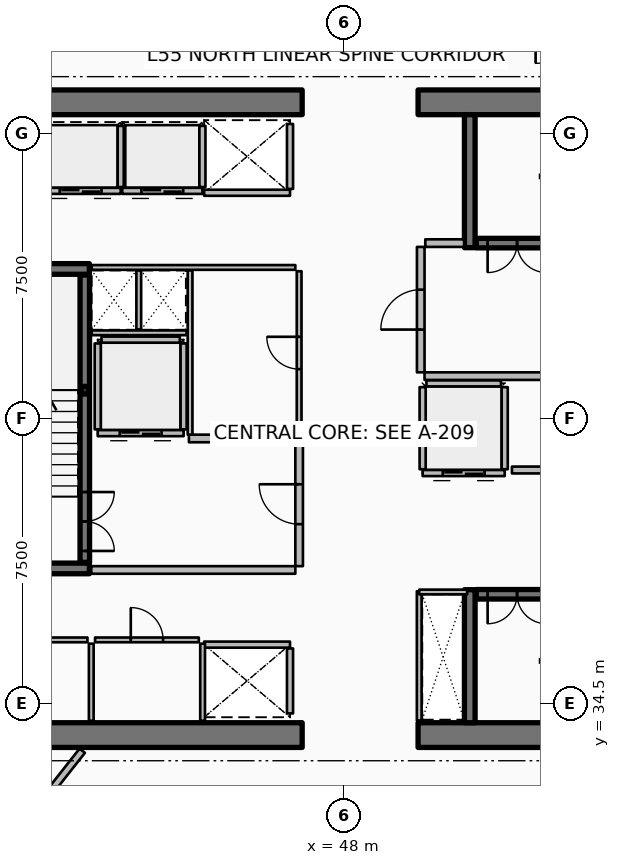
"""IFC4 building model, lengths in metres.
Left out: names, types, materials, properties, quantities, classifications, styles, units other than length and angle.
Written with IfcOpenShell. Run it as: python <this file> out.ifc"""

import sys

from ifc_helpers import new_model, si_unit, direction, frame, frame_2d, origin, origin_2d, place, context, subcontext, project, spatial, rectangle, hollow_rectangle, extrude, element, fill, save


model = new_model("IFC4")
c1 = context("Model", 3, precision=1e-05, world=origin(), true_north=direction((0.0, 1.0)))
c2 = subcontext(c1, "Body", "Model", "MODEL_VIEW")
j1 = project(units=[si_unit("LENGTHUNIT", "METRE"), si_unit("PLANEANGLEUNIT", "RADIAN")], contexts=[c1])
p1 = place(None, origin())
s1 = spatial("IfcSite", under=j1, at=p1, CompositionType="ELEMENT")
p2 = place(p1, origin())
s2 = spatial("IfcBuilding", under=s1, at=p2, CompositionType="ELEMENT")
p3 = place(p2, frame((0.0, 0.0, 217.8)))
s3 = spatial("IfcBuildingStorey", under=s2, at=p3, CompositionType="ELEMENT", Elevation=217.8)
for number, where, z_axis, x_axis in (
    (1, (37.15, 33.675, 0.0), (0.0, 0.0, 1.0), (1.0, 0.0, 0.0)),
    (2, (49.95, 33.675, 0.0), (0.0, 0.0, 1.0), (1.0, 0.0, 0.0)),
    (3, (37.15, 50.325, 0.0), (0.0, 0.0, 1.0), (1.0, 0.0, 0.0)),
    (4, (49.95, 50.325, 0.0), (0.0, 0.0, 1.0), (1.0, 0.0, 0.0)),
):
    element("IfcWall", number, at=place(p3, frame(where, z_axis=z_axis, x_axis=x_axis)), inside=s3, PredefinedType="SHEAR", context=c2, shape_type="SweptSolid", body=[
        extrude(rectangle(XDim=9.75, YDim=0.65, at=frame_2d((4.875, 0.0))), origin(), (0.0, 0.0, 1.0), 3.75),
    ])
for number, where, z_axis, x_axis in (
    (5, (37.8, 38.06, 0.0), (0.0, 0.0, 1.0), (1.0, 0.0, 0.0)),
    (6, (37.8, 45.94, 0.0), (0.0, 0.0, 1.0), (1.0, 0.0, 0.0)),
    (7, (51.31, 46.5, 0.0), (0.0, 0.0, 1.0), (0.0, 1.0, 0.0)),
    (8, (51.31, 34.0, 0.0), (0.0, 0.0, 1.0), (0.0, 1.0, 0.0)),
):
    element("IfcWall", number, at=place(p3, frame(where, z_axis=z_axis, x_axis=x_axis)), inside=s3, PredefinedType="SHEAR", context=c2, shape_type="SweptSolid", body=[
        extrude(rectangle(XDim=3.5, YDim=0.28, at=frame_2d((1.75, 0.0))), origin(), (0.0, 0.0, 1.0), 3.75),
    ])
p4 = place(p3, frame((41.18, 42.75, 0.0), z_axis=(0.0, 0.0, 1.0), x_axis=(1.0, 0.0, 0.0)))
e9 = element("IfcColumn", 9, at=p4, inside=s3, PredefinedType="COLUMN", context=c2, shape_type="SweptSolid", body=[
    extrude(hollow_rectangle(XDim=0.2, YDim=0.2, WallThickness=0.01, InnerFilletRadius=0.01, OuterFilletRadius=0.02, at=origin_2d()), origin(), (0.0, 0.0, 1.0), 1.67),
])
p5 = place(p3, frame((41.18, 38.22, 0.0), z_axis=(0.0, 0.0, 1.0), x_axis=(0.0, 1.0, 0.0)))
e10 = element("IfcWall", 10, at=p5, inside=s3, PredefinedType="SOLIDWALL", context=c2, shape_type="SweptSolid", body=[
    extrude(rectangle(XDim=7.56, YDim=0.25, at=frame_2d((3.78, 0.0))), origin(), (0.0, 0.0, 1.0), 3.5),
])
p6 = place(p5, frame((0.3, 0.0, 0.0)))
e11 = element("IfcOpeningElement", 11, at=p6, cuts=e10, PredefinedType="OPENING", context=c2, shape_type="SweptSolid", body=[
    extrude(rectangle(XDim=1.55, YDim=2.15, at=frame_2d((0.775, 1.075))), frame((0.0, 0.135, 0.0), z_axis=(0.0, -1.0, 0.0), x_axis=(1.0, 0.0, 0.0)), (0.0, 0.0, 1.0), 0.27),
])
p7 = place(p3, frame((51.48, 46.62, 0.0), z_axis=(0.0, 0.0, 1.0), x_axis=(1.0, 0.0, 0.0)))
e12 = element("IfcWall", 12, at=p7, inside=s3, PredefinedType="SOLIDWALL", context=c2, shape_type="SweptSolid", body=[
    extrude(rectangle(XDim=7.54, YDim=0.25, at=frame_2d((3.77, 0.0))), origin(), (0.0, 0.0, 1.0), 3.5),
])
p8 = place(p7, frame((0.3, 0.0, 0.0)))
e13 = element("IfcOpeningElement", 13, at=p8, cuts=e12, PredefinedType="OPENING", context=c2, shape_type="SweptSolid", body=[
    extrude(rectangle(XDim=1.55, YDim=2.15, at=frame_2d((0.775, 1.075))), frame((0.0, 0.135, 0.0), z_axis=(0.0, -1.0, 0.0), x_axis=(1.0, 0.0, 0.0)), (0.0, 0.0, 1.0), 0.27),
])
p9 = place(p3, frame((51.48, 37.38, 0.0), z_axis=(0.0, 0.0, 1.0), x_axis=(1.0, 0.0, 0.0)))
e14 = element("IfcWall", 14, at=p9, inside=s3, PredefinedType="SOLIDWALL", context=c2, shape_type="SweptSolid", body=[
    extrude(rectangle(XDim=7.54, YDim=0.25, at=frame_2d((3.77, 0.0))), origin(), (0.0, 0.0, 1.0), 3.5),
])
p10 = place(p9, frame((0.3, 0.0, 0.0)))
e15 = element("IfcOpeningElement", 15, at=p10, cuts=e14, PredefinedType="OPENING", context=c2, shape_type="SweptSolid", body=[
    extrude(rectangle(XDim=1.55, YDim=2.15, at=frame_2d((0.775, 1.075))), frame((0.0, 0.135, 0.0), z_axis=(0.0, -1.0, 0.0), x_axis=(1.0, 0.0, 0.0)), (0.0, 0.0, 1.0), 0.27),
])
p11 = place(p3, frame((42.125, 47.995, 0.0), z_axis=(0.0, 0.0, 1.0), x_axis=(-1.0, 0.0, 0.0)))
e16 = element("IfcWall", 16, at=p11, inside=s3, PredefinedType="PARTITIONING", context=c2, shape_type="SweptSolid", body=[
    extrude(rectangle(XDim=2.11, YDim=0.16, at=frame_2d((1.055, 0.0))), origin(), (0.0, 0.0, 1.0), 3.5),
])
p12 = place(p11, frame((0.505, 0.0, 0.0)))
e17 = element("IfcOpeningElement", 17, at=p12, cuts=e16, PredefinedType="OPENING", context=c2, shape_type="SweptSolid", body=[
    extrude(rectangle(XDim=1.1, YDim=2.1, at=frame_2d((0.55, 1.05))), frame((0.0, 0.09, 0.0), z_axis=(0.0, -1.0, 0.0), x_axis=(1.0, 0.0, 0.0)), (0.0, 0.0, 1.0), 0.18),
])
p13 = place(p3, frame((42.125, 48.095, 0.0), z_axis=(0.0, 0.0, 1.0), x_axis=(0.0, 1.0, 0.0)))
e18 = element("IfcWall", 18, at=p13, inside=s3, PredefinedType="PARTITIONING", context=c2, shape_type="SweptSolid", body=[
    extrude(rectangle(XDim=1.61, YDim=0.16, at=frame_2d((0.805, 0.0))), origin(), (0.0, 0.0, 1.0), 3.5),
])
p14 = place(p3, frame((44.275, 47.995, 0.0), z_axis=(0.0, 0.0, 1.0), x_axis=(-1.0, 0.0, 0.0)))
e19 = element("IfcWall", 19, at=p14, inside=s3, PredefinedType="PARTITIONING", context=c2, shape_type="SweptSolid", body=[
    extrude(rectangle(XDim=2.11, YDim=0.16, at=frame_2d((1.055, 0.0))), origin(), (0.0, 0.0, 1.0), 3.5),
])
p15 = place(p14, frame((0.505, 0.0, 0.0)))
e20 = element("IfcOpeningElement", 20, at=p15, cuts=e19, PredefinedType="OPENING", context=c2, shape_type="SweptSolid", body=[
    extrude(rectangle(XDim=1.1, YDim=2.1, at=frame_2d((0.55, 1.05))), frame((0.0, 0.09, 0.0), z_axis=(0.0, -1.0, 0.0), x_axis=(1.0, 0.0, 0.0)), (0.0, 0.0, 1.0), 0.18),
])
p16 = place(p3, frame((44.275, 48.095, 0.0), z_axis=(0.0, 0.0, 1.0), x_axis=(0.0, 1.0, 0.0)))
e21 = element("IfcWall", 21, at=p16, inside=s3, PredefinedType="PARTITIONING", context=c2, shape_type="SweptSolid", body=[
    extrude(rectangle(XDim=1.61, YDim=0.16, at=frame_2d((0.805, 0.0))), origin(), (0.0, 0.0, 1.0), 3.5),
])
p17 = place(p3, frame((46.58, 47.945, 0.0), z_axis=(0.0, 0.0, 1.0), x_axis=(-1.0, 0.0, 0.0)))
e22 = element("IfcWall", 22, at=p17, inside=s3, PredefinedType="PARTITIONING", context=c2, shape_type="SweptSolid", body=[
    extrude(rectangle(XDim=2.26, YDim=0.16, at=frame_2d((1.13, 0.0))), origin(), (0.0, 0.0, 1.0), 3.5),
])
p18 = place(p3, frame((46.58, 48.045, 0.0), z_axis=(0.0, 0.0, 1.0), x_axis=(0.0, 1.0, 0.0)))
e23 = element("IfcWall", 23, at=p18, inside=s3, PredefinedType="PARTITIONING", context=c2, shape_type="SweptSolid", body=[
    extrude(rectangle(XDim=1.71, YDim=0.16, at=frame_2d((0.855, 0.0))), origin(), (0.0, 0.0, 1.0), 3.5),
])
p19 = place(p3, frame((44.32, 36.055, 0.0), z_axis=(0.0, 0.0, 1.0), x_axis=(1.0, 0.0, 0.0)))
e24 = element("IfcWall", 24, at=p19, inside=s3, PredefinedType="PARTITIONING", context=c2, shape_type="SweptSolid", body=[
    extrude(rectangle(XDim=2.26, YDim=0.16, at=frame_2d((1.13, 0.0))), origin(), (0.0, 0.0, 1.0), 3.5),
])
p20 = place(p3, frame((46.58, 34.245, 0.0), z_axis=(0.0, 0.0, 1.0), x_axis=(0.0, 1.0, 0.0)))
e25 = element("IfcWall", 25, at=p20, inside=s3, PredefinedType="PARTITIONING", context=c2, shape_type="SweptSolid", body=[
    extrude(rectangle(XDim=1.71, YDim=0.16, at=frame_2d((0.855, 0.0))), origin(), (0.0, 0.0, 1.0), 3.5),
])
p21 = place(p3, frame((43.78, 41.62, 0.0), z_axis=(0.0, 0.0, 1.0), x_axis=(-1.0, 0.0, 0.0)))
e26 = element("IfcWall", 26, at=p21, inside=s3, PredefinedType="PARTITIONING", context=c2, shape_type="SweptSolid", body=[
    extrude(rectangle(XDim=2.26, YDim=0.16, at=frame_2d((1.13, 0.0))), origin(), (0.0, 0.0, 1.0), 3.5),
])
p22 = place(p21, frame((0.58, 0.0, 0.0)))
e27 = element("IfcOpeningElement", 27, at=p22, cuts=e26, PredefinedType="OPENING", context=c2, shape_type="SweptSolid", body=[
    extrude(rectangle(XDim=1.1, YDim=2.1, at=frame_2d((0.55, 1.05))), frame((0.0, 0.09, 0.0), z_axis=(0.0, -1.0, 0.0), x_axis=(1.0, 0.0, 0.0)), (0.0, 0.0, 1.0), 0.18),
])
for number, where, z_axis, x_axis in (
    (28, (43.78, 41.72, 0.0), (0.0, 0.0, 1.0), (0.0, 1.0, 0.0)),
    (29, (41.52, 41.72, 0.0), (0.0, 0.0, 1.0), (0.0, 1.0, 0.0)),
):
    element("IfcWall", number, at=place(p3, frame(where, z_axis=z_axis, x_axis=x_axis)), inside=s3, PredefinedType="PARTITIONING", context=c2, shape_type="SweptSolid", body=[
        extrude(rectangle(XDim=2.26, YDim=0.16, at=frame_2d((1.13, 0.0))), origin(), (0.0, 0.0, 1.0), 3.5),
    ])
p23 = place(p3, frame((41.62, 44.08, 0.0), z_axis=(0.0, 0.0, 1.0), x_axis=(1.0, 0.0, 0.0)))
e30 = element("IfcWall", 30, at=p23, inside=s3, PredefinedType="PARTITIONING", context=c2, shape_type="SweptSolid", body=[
    extrude(rectangle(XDim=2.06, YDim=0.16, at=frame_2d((1.03, 0.0))), origin(), (0.0, 0.0, 1.0), 3.5),
])
p24 = place(p3, frame((52.23, 40.57, 0.0), z_axis=(0.0, 0.0, 1.0), x_axis=(-1.0, 0.0, 0.0)))
e31 = element("IfcWall", 31, at=p24, inside=s3, PredefinedType="PARTITIONING", context=c2, shape_type="SweptSolid", body=[
    extrude(rectangle(XDim=2.16, YDim=0.16, at=frame_2d((1.08, 0.0))), origin(), (0.0, 0.0, 1.0), 3.5),
])
p25 = place(p24, frame((0.53, 0.0, 0.0)))
e32 = element("IfcOpeningElement", 32, at=p25, cuts=e31, PredefinedType="OPENING", context=c2, shape_type="SweptSolid", body=[
    extrude(rectangle(XDim=1.1, YDim=2.1, at=frame_2d((0.55, 1.05))), frame((0.0, 0.09, 0.0), z_axis=(0.0, -1.0, 0.0), x_axis=(1.0, 0.0, 0.0)), (0.0, 0.0, 1.0), 0.18),
])
for number, where, z_axis, x_axis in (
    (33, (52.23, 40.67, 0.0), (0.0, 0.0, 1.0), (0.0, 1.0, 0.0)),
    (34, (50.07, 40.67, 0.0), (0.0, 0.0, 1.0), (0.0, 1.0, 0.0)),
):
    element("IfcWall", number, at=place(p3, frame(where, z_axis=z_axis, x_axis=x_axis)), inside=s3, PredefinedType="PARTITIONING", context=c2, shape_type="SweptSolid", body=[
        extrude(rectangle(XDim=2.16, YDim=0.16, at=frame_2d((1.08, 0.0))), origin(), (0.0, 0.0, 1.0), 3.5),
    ])
p26 = place(p3, frame((50.17, 42.93, 0.0), z_axis=(0.0, 0.0, 1.0), x_axis=(1.0, 0.0, 0.0)))
e35 = element("IfcWall", 35, at=p26, inside=s3, PredefinedType="PARTITIONING", context=c2, shape_type="SweptSolid", body=[
    extrude(rectangle(XDim=1.96, YDim=0.16, at=frame_2d((0.98, 0.0))), origin(), (0.0, 0.0, 1.0), 3.5),
])
p27 = place(p3, frame((52.42, 40.65, 0.0), z_axis=(0.0, 0.0, 1.0), x_axis=(1.0, 0.0, 0.0)))
e36 = element("IfcWall", 36, at=p27, inside=s3, PredefinedType="PARTITIONING", context=c2, shape_type="SweptSolid", body=[
    extrude(rectangle(XDim=6.5, YDim=0.18, at=frame_2d((3.25, 0.0))), origin(), (0.0, 0.0, 1.0), 3.5),
])
p28 = place(p27, frame((2.825, 0.0, 0.0)))
e37 = element("IfcOpeningElement", 37, at=p28, cuts=e36, PredefinedType="OPENING", context=c2, shape_type="SweptSolid", body=[
    extrude(rectangle(XDim=0.85, YDim=2.06, at=frame_2d((0.425, 1.03))), frame((0.0, 0.1, 0.0), z_axis=(0.0, -1.0, 0.0), x_axis=(1.0, 0.0, 0.0)), (0.0, 0.0, 1.0), 0.2),
])
for number, where, z_axis, x_axis in (
    (38, (44.28, 34.05, 0.0), (0.0, 0.0, 1.0), (0.0, 1.0, 0.0)),
    (39, (41.35, 34.05, 0.0), (0.0, 0.0, 1.0), (0.0, 1.0, 0.0)),
):
    element("IfcWall", number, at=place(p3, frame(where, z_axis=z_axis, x_axis=x_axis)), inside=s3, PredefinedType="PARTITIONING", context=c2, shape_type="SweptSolid", body=[
        extrude(rectangle(XDim=2.03, YDim=0.125, at=frame_2d((1.015, 0.0))), origin(), (0.0, 0.0, 1.0), 2.94),
    ])
p29 = place(p3, frame((37.92, 36.18, 0.0), z_axis=(0.0, 0.0, 1.0), x_axis=(1.0, 0.0, 0.0)))
e40 = element("IfcWall", 40, at=p29, inside=s3, PredefinedType="PARTITIONING", context=c2, shape_type="SweptSolid", body=[
    extrude(rectangle(XDim=3.33, YDim=0.125, at=frame_2d((1.665, 0.0))), origin(), (0.0, 0.0, 1.0), 2.94),
])
p30 = place(p29, frame((1.24, 0.0, 0.0)))
e41 = element("IfcOpeningElement", 41, at=p30, cuts=e40, PredefinedType="OPENING", context=c2, shape_type="SweptSolid", body=[
    extrude(rectangle(XDim=0.85, YDim=2.06, at=frame_2d((0.425, 1.03))), frame((0.0, 0.073, 0.0), z_axis=(0.0, -1.0, 0.0), x_axis=(1.0, 0.0, 0.0)), (0.0, 0.0, 1.0), 0.145),
])
p31 = place(p3, frame((41.45, 36.18, 0.0), z_axis=(0.0, 0.0, 1.0), x_axis=(1.0, 0.0, 0.0)))
e42 = element("IfcWall", 42, at=p31, inside=s3, PredefinedType="PARTITIONING", context=c2, shape_type="SweptSolid", body=[
    extrude(rectangle(XDim=2.73, YDim=0.125, at=frame_2d((1.365, 0.0))), origin(), (0.0, 0.0, 1.0), 2.94),
])
p32 = place(p31, frame((0.94, 0.0, 0.0)))
e43 = element("IfcOpeningElement", 43, at=p32, cuts=e42, PredefinedType="OPENING", context=c2, shape_type="SweptSolid", body=[
    extrude(rectangle(XDim=0.85, YDim=2.06, at=frame_2d((0.425, 1.03))), frame((0.0, 0.073, 0.0), z_axis=(0.0, -1.0, 0.0), x_axis=(1.0, 0.0, 0.0)), (0.0, 0.0, 1.0), 0.145),
])
p33 = place(p3, frame((41.35, 38.02, 0.0), z_axis=(0.0, 0.0, 1.0), x_axis=(1.0, 0.0, 0.0)))
e44 = element("IfcWall", 44, at=p33, inside=s3, PredefinedType="PARTITIONING", context=c2, shape_type="SweptSolid", body=[
    extrude(rectangle(XDim=5.37, YDim=0.2, at=frame_2d((2.685, 0.0))), origin(), (0.0, 0.0, 1.0), 3.5),
])
p34 = place(p3, frame((43.92, 41.48, 0.0), z_axis=(0.0, 0.0, 1.0), x_axis=(1.0, 0.0, 0.0)))
e45 = element("IfcWall", 45, at=p34, inside=s3, PredefinedType="PARTITIONING", context=c2, shape_type="SweptSolid", body=[
    extrude(rectangle(XDim=2.8, YDim=0.2, at=frame_2d((1.4, 0.0))), origin(), (0.0, 0.0, 1.0), 3.5),
])
p35 = place(p3, frame((46.82, 38.12, 0.0), z_axis=(0.0, 0.0, 1.0), x_axis=(0.0, 1.0, 0.0)))
e46 = element("IfcWall", 46, at=p35, inside=s3, PredefinedType="PARTITIONING", context=c2, shape_type="SweptSolid", body=[
    extrude(rectangle(XDim=3.26, YDim=0.2, at=frame_2d((1.63, 0.0))), origin(), (0.0, 0.0, 1.0), 3.5),
])
p36 = place(p35, frame((1.105, 0.0, 0.0)))
e47 = element("IfcOpeningElement", 47, at=p36, cuts=e46, PredefinedType="OPENING", context=c2, shape_type="SweptSolid", body=[
    extrude(rectangle(XDim=1.05, YDim=2.1, at=frame_2d((0.525, 1.05))), frame((0.0, 0.11, 0.0), z_axis=(0.0, -1.0, 0.0), x_axis=(1.0, 0.0, 0.0)), (0.0, 0.0, 1.0), 0.22),
])
p37 = place(p3, frame((50.12, 43.12, 0.0), z_axis=(0.0, 0.0, 1.0), x_axis=(1.0, 0.0, 0.0)))
e48 = element("IfcWall", 48, at=p37, inside=s3, PredefinedType="PARTITIONING", context=c2, shape_type="SweptSolid", body=[
    extrude(rectangle(XDim=8.88, YDim=0.2, at=frame_2d((4.44, 0.0))), origin(), (0.0, 0.0, 1.0), 3.5),
])
p38 = place(p3, frame((50.14, 46.62, 0.0), z_axis=(0.0, 0.0, 1.0), x_axis=(1.0, 0.0, 0.0)))
e49 = element("IfcWall", 49, at=p38, inside=s3, PredefinedType="PARTITIONING", context=c2, shape_type="SweptSolid", body=[
    extrude(rectangle(XDim=1.02, YDim=0.2, at=frame_2d((0.51, 0.0))), origin(), (0.0, 0.0, 1.0), 3.5),
])
p39 = place(p3, frame((50.02, 43.22, 0.0), z_axis=(0.0, 0.0, 1.0), x_axis=(0.0, 1.0, 0.0)))
e50 = element("IfcWall", 50, at=p39, inside=s3, PredefinedType="PARTITIONING", context=c2, shape_type="SweptSolid", body=[
    extrude(rectangle(XDim=3.3, YDim=0.2, at=frame_2d((1.65, 0.0))), origin(), (0.0, 0.0, 1.0), 3.5),
])
p40 = place(p39, frame((1.125, 0.0, 0.0)))
e51 = element("IfcOpeningElement", 51, at=p40, cuts=e50, PredefinedType="OPENING", context=c2, shape_type="SweptSolid", body=[
    extrude(rectangle(XDim=1.05, YDim=2.1, at=frame_2d((0.525, 1.05))), frame((0.0, 0.11, 0.0), z_axis=(0.0, -1.0, 0.0), x_axis=(1.0, 0.0, 0.0)), (0.0, 0.0, 1.0), 0.22),
])
p41 = place(p3, frame((41.36, 45.98, 0.0), z_axis=(0.0, 0.0, 1.0), x_axis=(1.0, 0.0, 0.0)))
e52 = element("IfcWall", 52, at=p41, inside=s3, PredefinedType="PARTITIONING", context=c2, shape_type="SweptSolid", body=[
    extrude(rectangle(XDim=5.36, YDim=0.125, at=frame_2d((2.68, 0.0))), origin(), (0.0, 0.0, 1.0), 2.94),
])
p42 = place(p3, frame((41.36, 44.26, 0.0), z_axis=(0.0, 0.0, 1.0), x_axis=(1.0, 0.0, 0.0)))
e53 = element("IfcWall", 53, at=p42, inside=s3, PredefinedType="PARTITIONING", context=c2, shape_type="SweptSolid", body=[
    extrude(rectangle(XDim=2.5, YDim=0.125, at=frame_2d((1.25, 0.0))), origin(), (0.0, 0.0, 1.0), 2.94),
])
p43 = place(p3, frame((42.6, 44.35, 0.0), z_axis=(0.0, 0.0, 1.0), x_axis=(0.0, 1.0, 0.0)))
e54 = element("IfcWall", 54, at=p43, inside=s3, PredefinedType="PARTITIONING", context=c2, shape_type="SweptSolid", body=[
    extrude(rectangle(XDim=1.55, YDim=0.125, at=frame_2d((0.775, 0.0))), origin(), (0.0, 0.0, 1.0), 2.94),
])
p44 = place(p3, frame((49.98, 34.06, 0.0), z_axis=(0.0, 0.0, 1.0), x_axis=(0.0, 1.0, 0.0)))
e55 = element("IfcWall", 55, at=p44, inside=s3, PredefinedType="PARTITIONING", context=c2, shape_type="SweptSolid", body=[
    extrude(rectangle(XDim=3.4, YDim=0.125, at=frame_2d((1.7, 0.0))), origin(), (0.0, 0.0, 1.0), 2.94),
])
p45 = place(p3, frame((49.98, 37.44, 0.0), z_axis=(0.0, 0.0, 1.0), x_axis=(1.0, 0.0, 0.0)))
e56 = element("IfcWall", 56, at=p45, inside=s3, PredefinedType="PARTITIONING", context=c2, shape_type="SweptSolid", body=[
    extrude(rectangle(XDim=1.26, YDim=0.125, at=frame_2d((0.63, 0.0))), origin(), (0.0, 0.0, 1.0), 2.94),
])
p46 = place(p3, frame((43.95, 41.58, 0.0), z_axis=(0.0, 0.0, 1.0), x_axis=(0.0, 1.0, 0.0)))
e57 = element("IfcWall", 57, at=p46, inside=s3, PredefinedType="PARTITIONING", context=c2, shape_type="SweptSolid", body=[
    extrude(rectangle(XDim=4.32, YDim=0.125, at=frame_2d((2.16, 0.0))), origin(), (0.0, 0.0, 1.0), 2.94),
])
p47 = place(p3, frame((46.82, 41.58, 0.0), z_axis=(0.0, 0.0, 1.0), x_axis=(0.0, 1.0, 0.0)))
e58 = element("IfcWall", 58, at=p47, inside=s3, PredefinedType="PARTITIONING", context=c2, shape_type="SweptSolid", body=[
    extrude(rectangle(XDim=4.3, YDim=0.125, at=frame_2d((2.15, 0.0))), origin(), (0.0, 0.0, 1.0), 2.94),
])
p48 = place(p47, frame((1.725, 0.0, 0.0)))
e59 = element("IfcOpeningElement", 59, at=p48, cuts=e58, PredefinedType="OPENING", context=c2, shape_type="SweptSolid", body=[
    extrude(rectangle(XDim=0.85, YDim=2.06, at=frame_2d((0.425, 1.03))), frame((0.0, 0.073, 0.0), z_axis=(0.0, -1.0, 0.0), x_axis=(1.0, 0.0, 0.0)), (0.0, 0.0, 1.0), 0.145),
])
p49 = place(p3, frame((41.113, 33.264, 0.0), z_axis=(0.0, 0.0, 1.0), x_axis=(-0.619089233189, -0.785320648748, 0.0)))
e60 = element("IfcWall", 60, at=p49, inside=s3, PredefinedType="PARTITIONING", context=c2, shape_type="SweptSolid", body=[
    extrude(rectangle(XDim=16.006, YDim=0.18, at=frame_2d((8.003, 0.0))), origin(), (0.0, 0.0, 1.0), 2.94),
])
p50 = place(p6, origin())
e61 = element("IfcDoor", 61, at=p50, inside=s3, OperationType="DOUBLE_DOOR_SINGLE_SWING", PredefinedType="DOOR", context=c2, shape_type="SweptSolid", body=[
    extrude(rectangle(XDim=1.55, YDim=2.15, at=frame_2d((0.775, 1.075))), frame((0.0, 0.025, 0.0), z_axis=(0.0, -1.0, 0.0), x_axis=(1.0, 0.0, 0.0)), (0.0, 0.0, 1.0), 0.05),
])
fill(e11, e61)
p51 = place(p8, origin())
e62 = element("IfcDoor", 62, at=p51, inside=s3, OperationType="DOUBLE_DOOR_SINGLE_SWING", PredefinedType="DOOR", context=c2, shape_type="SweptSolid", body=[
    extrude(rectangle(XDim=1.55, YDim=2.15, at=frame_2d((0.775, 1.075))), frame((0.0, 0.025, 0.0), z_axis=(0.0, -1.0, 0.0), x_axis=(1.0, 0.0, 0.0)), (0.0, 0.0, 1.0), 0.05),
])
fill(e13, e62)
p52 = place(p10, origin())
e63 = element("IfcDoor", 63, at=p52, inside=s3, OperationType="DOUBLE_DOOR_SINGLE_SWING", PredefinedType="DOOR", context=c2, shape_type="SweptSolid", body=[
    extrude(rectangle(XDim=1.55, YDim=2.15, at=frame_2d((0.775, 1.075))), frame((0.0, 0.025, 0.0), z_axis=(0.0, -1.0, 0.0), x_axis=(1.0, 0.0, 0.0)), (0.0, 0.0, 1.0), 0.05),
])
fill(e15, e63)
p53 = place(p12, origin())
e64 = element("IfcDoor", 64, at=p53, inside=s3, OperationType="DOUBLE_DOOR_SLIDING", PredefinedType="DOOR", context=c2, shape_type="SweptSolid", body=[
    extrude(rectangle(XDim=1.1, YDim=2.1, at=frame_2d((0.55, 1.05))), frame((0.0, 0.025, 0.0), z_axis=(0.0, -1.0, 0.0), x_axis=(1.0, 0.0, 0.0)), (0.0, 0.0, 1.0), 0.05),
])
fill(e17, e64)
p54 = place(p15, origin())
e65 = element("IfcDoor", 65, at=p54, inside=s3, OperationType="DOUBLE_DOOR_SLIDING", PredefinedType="DOOR", context=c2, shape_type="SweptSolid", body=[
    extrude(rectangle(XDim=1.1, YDim=2.1, at=frame_2d((0.55, 1.05))), frame((0.0, 0.025, 0.0), z_axis=(0.0, -1.0, 0.0), x_axis=(1.0, 0.0, 0.0)), (0.0, 0.0, 1.0), 0.05),
])
fill(e20, e65)
p55 = place(p22, origin())
e66 = element("IfcDoor", 66, at=p55, inside=s3, OperationType="DOUBLE_DOOR_SLIDING", PredefinedType="DOOR", context=c2, shape_type="SweptSolid", body=[
    extrude(rectangle(XDim=1.1, YDim=2.1, at=frame_2d((0.55, 1.05))), frame((0.0, 0.025, 0.0), z_axis=(0.0, -1.0, 0.0), x_axis=(1.0, 0.0, 0.0)), (0.0, 0.0, 1.0), 0.05),
])
fill(e27, e66)
p56 = place(p25, origin())
e67 = element("IfcDoor", 67, at=p56, inside=s3, OperationType="DOUBLE_DOOR_SLIDING", PredefinedType="DOOR", context=c2, shape_type="SweptSolid", body=[
    extrude(rectangle(XDim=1.1, YDim=2.1, at=frame_2d((0.55, 1.05))), frame((0.0, 0.025, 0.0), z_axis=(0.0, -1.0, 0.0), x_axis=(1.0, 0.0, 0.0)), (0.0, 0.0, 1.0), 0.05),
])
fill(e32, e67)
p57 = place(p32, origin())
e68 = element("IfcDoor", 68, at=p57, inside=s3, OperationType="SINGLE_SWING_LEFT", PredefinedType="DOOR", context=c2, shape_type="SweptSolid", body=[
    extrude(rectangle(XDim=0.85, YDim=2.06, at=frame_2d((0.425, 1.03))), frame((0.0, 0.025, 0.0), z_axis=(0.0, -1.0, 0.0), x_axis=(1.0, 0.0, 0.0)), (0.0, 0.0, 1.0), 0.05),
])
fill(e43, e68)
p58 = place(p36, origin())
e69 = element("IfcDoor", 69, at=p58, inside=s3, OperationType="SINGLE_SWING_RIGHT", PredefinedType="DOOR", context=c2, shape_type="SweptSolid", body=[
    extrude(rectangle(XDim=1.05, YDim=2.1, at=frame_2d((0.525, 1.05))), frame((0.0, 0.025, 0.0), z_axis=(0.0, -1.0, 0.0), x_axis=(1.0, 0.0, 0.0)), (0.0, 0.0, 1.0), 0.05),
])
fill(e47, e69)
p59 = place(p40, origin())
e70 = element("IfcDoor", 70, at=p59, inside=s3, OperationType="SINGLE_SWING_LEFT", PredefinedType="DOOR", context=c2, shape_type="SweptSolid", body=[
    extrude(rectangle(XDim=1.05, YDim=2.1, at=frame_2d((0.525, 1.05))), frame((0.0, 0.025, 0.0), z_axis=(0.0, -1.0, 0.0), x_axis=(1.0, 0.0, 0.0)), (0.0, 0.0, 1.0), 0.05),
])
fill(e51, e70)
p60 = place(p48, origin())
e71 = element("IfcDoor", 71, at=p60, inside=s3, OperationType="SINGLE_SWING_RIGHT", PredefinedType="DOOR", context=c2, shape_type="SweptSolid", body=[
    extrude(rectangle(XDim=0.85, YDim=2.06, at=frame_2d((0.425, 1.03))), frame((0.0, 0.025, 0.0), z_axis=(0.0, -1.0, 0.0), x_axis=(1.0, 0.0, 0.0)), (0.0, 0.0, 1.0), 0.05),
])
fill(e59, e71)
save(model, sys.argv[1])
